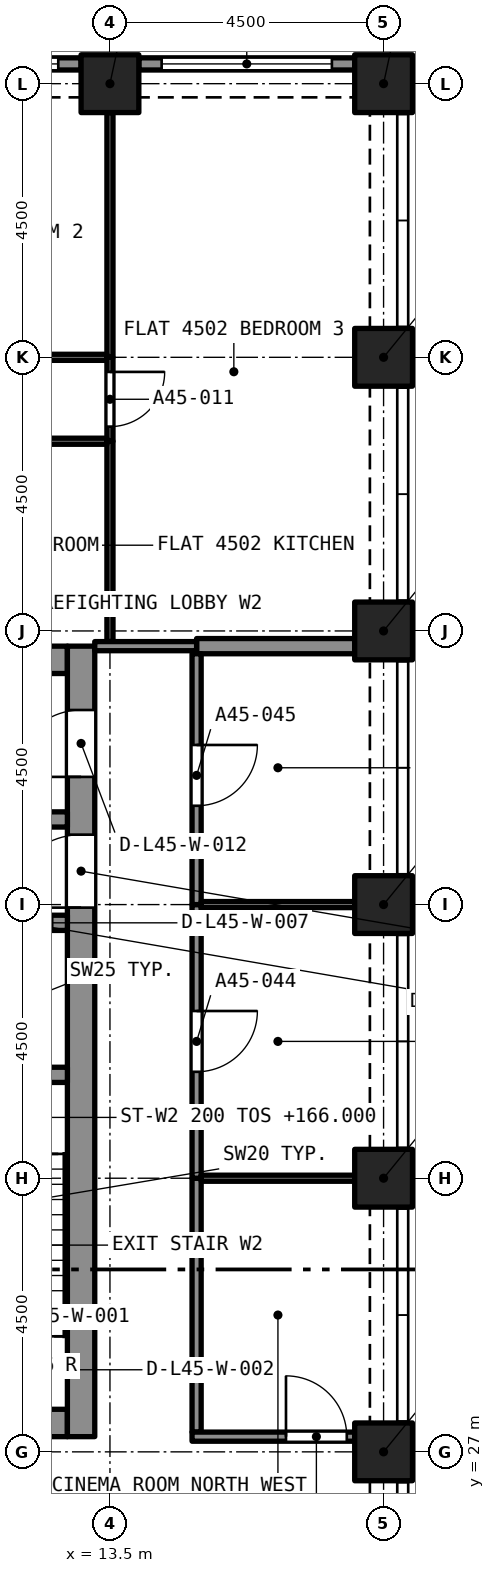
"""IFC4 building model, lengths in metres.
Left out: names, types, materials, properties, quantities, classifications, styles, units other than length and angle.
Written with IfcOpenShell. Run it as: python <this file> out.ifc"""

import sys

from ifc_helpers import new_model, si_unit, direction, frame, frame_2d, origin, origin_2d, place, context, subcontext, project, spatial, rectangle, extrude, element, fill, save


model = new_model("IFC4")
c1 = context("Model", 3, precision=1e-05, world=origin(), true_north=direction((0.0, 1.0)))
c2 = subcontext(c1, "Body", "Model", "MODEL_VIEW")
j1 = project(units=[si_unit("LENGTHUNIT", "METRE"), si_unit("PLANEANGLEUNIT", "RADIAN")], contexts=[c1])
p1 = place(None, origin())
s1 = spatial("IfcSite", under=j1, at=p1, CompositionType="ELEMENT")
p2 = place(p1, origin())
s2 = spatial("IfcBuilding", under=s1, at=p2, CompositionType="ELEMENT")
p3 = place(p2, frame((0.0, 0.0, 163.8)))
s3 = spatial("IfcBuildingStorey", under=s2, at=p3, CompositionType="ELEMENT", Elevation=163.8)
for number, where, z_axis, x_axis in (
    (1, (18.0, 27.0, 0.0), (0.0, 0.0, 1.0), (1.0, 0.0, 0.0)),
    (2, (18.0, 31.5, 0.0), (0.0, 0.0, 1.0), (1.0, 0.0, 0.0)),
    (3, (18.0, 36.0, 0.0), (0.0, 0.0, 1.0), (1.0, 0.0, 0.0)),
    (4, (18.0, 40.5, 0.0), (0.0, 0.0, 1.0), (1.0, 0.0, 0.0)),
    (5, (18.0, 45.0, 0.0), (0.0, 0.0, 1.0), (1.0, 0.0, 0.0)),
    (6, (13.5, 49.5, 0.0), (0.0, 0.0, 1.0), (1.0, 0.0, 0.0)),
    (7, (18.0, 49.5, 0.0), (0.0, 0.0, 1.0), (1.0, 0.0, 0.0)),
):
    element("IfcColumn", number, at=place(p3, frame(where, z_axis=z_axis, x_axis=x_axis)), inside=s3, PredefinedType="COLUMN", context=c2, shape_type="SweptSolid", body=[
        extrude(rectangle(XDim=0.95, YDim=0.95, at=origin_2d()), origin(), (0.0, 0.0, 1.0), 4.4),
    ])
p4 = place(p3, frame((5.2, 27.475, 0.0), z_axis=(0.0, 0.0, 1.0), x_axis=(1.0, 0.0, 0.0)))
e8 = element("IfcWall", 8, at=p4, inside=s3, PredefinedType="SOLIDWALL", context=c2, shape_type="SweptSolid", body=[
    extrude(rectangle(XDim=7.6, YDim=0.45, at=frame_2d((3.8, 0.0))), origin(), (0.0, 0.0, 1.0), 4.4),
])
p5 = place(p4, frame((0.725, 0.0, 0.0)))
e9 = element("IfcOpeningElement", 9, at=p5, cuts=e8, PredefinedType="OPENING", context=c2, shape_type="SweptSolid", body=[
    extrude(rectangle(XDim=1.1, YDim=2.1, at=frame_2d((0.55, 1.05))), frame((0.0, 0.235, 0.0), z_axis=(0.0, -1.0, 0.0), x_axis=(1.0, 0.0, 0.0)), (0.0, 0.0, 1.0), 0.47),
])
p6 = place(p4, frame((3.25, 0.0, 0.0)))
e10 = element("IfcOpeningElement", 10, at=p6, cuts=e8, PredefinedType="OPENING", context=c2, shape_type="SweptSolid", body=[
    extrude(rectangle(XDim=1.1, YDim=2.1, at=frame_2d((0.55, 1.05))), frame((0.0, 0.235, 0.0), z_axis=(0.0, -1.0, 0.0), x_axis=(1.0, 0.0, 0.0)), (0.0, 0.0, 1.0), 0.47),
])
p7 = place(p4, frame((5.775, 0.0, 0.0)))
e11 = element("IfcOpeningElement", 11, at=p7, cuts=e8, PredefinedType="OPENING", context=c2, shape_type="SweptSolid", body=[
    extrude(rectangle(XDim=1.1, YDim=2.1, at=frame_2d((0.55, 1.05))), frame((0.0, 0.235, 0.0), z_axis=(0.0, -1.0, 0.0), x_axis=(1.0, 0.0, 0.0)), (0.0, 0.0, 1.0), 0.47),
])
p8 = place(p3, frame((5.2, 40.025, 0.0), z_axis=(0.0, 0.0, 1.0), x_axis=(1.0, 0.0, 0.0)))
e12 = element("IfcWall", 12, at=p8, inside=s3, PredefinedType="SOLIDWALL", context=c2, shape_type="SweptSolid", body=[
    extrude(rectangle(XDim=7.6, YDim=0.45, at=frame_2d((3.8, 0.0))), origin(), (0.0, 0.0, 1.0), 4.4),
])
p9 = place(p3, frame((13.025, 27.25, 0.0), z_axis=(0.0, 0.0, 1.0), x_axis=(0.0, 1.0, 0.0)))
e13 = element("IfcWall", 13, at=p9, inside=s3, PredefinedType="SOLIDWALL", context=c2, shape_type="SweptSolid", body=[
    extrude(rectangle(XDim=13.0, YDim=0.45, at=frame_2d((6.5, 0.0))), origin(), (0.0, 0.0, 1.0), 4.4),
])
p10 = place(p9, frame((10.85, 0.0, 0.0)))
e14 = element("IfcOpeningElement", 14, at=p10, cuts=e13, PredefinedType="OPENING", context=c2, shape_type="SweptSolid", body=[
    extrude(rectangle(XDim=1.1, YDim=2.1, at=frame_2d((0.55, 1.05))), frame((0.0, 0.235, 0.0), z_axis=(0.0, -1.0, 0.0), x_axis=(1.0, 0.0, 0.0)), (0.0, 0.0, 1.0), 0.47),
])
p11 = place(p9, frame((8.7, 0.0, 0.0)))
e15 = element("IfcOpeningElement", 15, at=p11, cuts=e13, PredefinedType="OPENING", context=c2, shape_type="SweptSolid", body=[
    extrude(rectangle(XDim=1.2, YDim=2.1, at=frame_2d((0.6, 1.05))), frame((0.0, 0.235, 0.0), z_axis=(0.0, -1.0, 0.0), x_axis=(1.0, 0.0, 0.0)), (0.0, 0.0, 1.0), 0.47),
])
p12 = place(p3, frame((13.975, 49.825, 0.0), z_axis=(0.0, 0.0, 1.0), x_axis=(1.0, 0.0, 0.0)))
e16 = element("IfcWall", 16, at=p12, inside=s3, PredefinedType="SOLIDWALL", context=c2, shape_type="SweptSolid", body=[
    extrude(rectangle(XDim=3.55, YDim=0.2, at=frame_2d((1.775, 0.0))), origin(), (0.0, 0.0, 1.0), 4.4),
])
p13 = place(p12, frame((0.375, 0.0, 0.45)))
e17 = element("IfcOpeningElement", 17, at=p13, cuts=e16, PredefinedType="OPENING", context=c2, shape_type="SweptSolid", body=[
    extrude(rectangle(XDim=2.8, YDim=2.55, at=frame_2d((1.4, 1.275))), frame((0.0, 0.11, 0.0), z_axis=(0.0, -1.0, 0.0), x_axis=(1.0, 0.0, 0.0)), (0.0, 0.0, 1.0), 0.22),
])
p14 = place(p3, frame((9.475, 49.825, 0.0), z_axis=(0.0, 0.0, 1.0), x_axis=(1.0, 0.0, 0.0)))
e18 = element("IfcWall", 18, at=p14, inside=s3, PredefinedType="SOLIDWALL", context=c2, shape_type="SweptSolid", body=[
    extrude(rectangle(XDim=3.55, YDim=0.2, at=frame_2d((1.775, 0.0))), origin(), (0.0, 0.0, 1.0), 4.4),
])
p15 = place(p14, frame((0.375, 0.0, 0.45)))
e19 = element("IfcOpeningElement", 19, at=p15, cuts=e18, PredefinedType="OPENING", context=c2, shape_type="SweptSolid", body=[
    extrude(rectangle(XDim=2.8, YDim=2.55, at=frame_2d((1.4, 1.275))), frame((0.0, 0.11, 0.0), z_axis=(0.0, -1.0, 0.0), x_axis=(1.0, 0.0, 0.0)), (0.0, 0.0, 1.0), 0.22),
])
p16 = place(p3, frame((13.5, 45.0, 0.0), z_axis=(0.0, 0.0, 1.0), x_axis=(0.0, 1.0, 0.0)))
e20 = element("IfcWall", 20, at=p16, inside=s3, PredefinedType="PARTITIONING", context=c2, shape_type="SweptSolid", body=[
    extrude(rectangle(XDim=4.025, YDim=0.1, at=frame_2d((2.012, 0.0))), origin(), (0.0, 0.0, 1.0), 4.1),
])
p17 = place(p3, frame((9.0, 45.0, 0.0), z_axis=(0.0, 0.0, 1.0), x_axis=(1.0, 0.0, 0.0)))
e21 = element("IfcWall", 21, at=p17, inside=s3, PredefinedType="PARTITIONING", context=c2, shape_type="SweptSolid", body=[
    extrude(rectangle(XDim=4.45, YDim=0.1, at=frame_2d((2.225, 0.0))), origin(), (0.0, 0.0, 1.0), 4.1),
])
p18 = place(p17, frame((1.8, 0.0, 0.0)))
e22 = element("IfcOpeningElement", 22, at=p18, cuts=e21, PredefinedType="OPENING", context=c2, shape_type="SweptSolid", body=[
    extrude(rectangle(XDim=0.9, YDim=2.1, at=frame_2d((0.45, 1.05))), frame((0.0, 0.06, 0.0), z_axis=(0.0, -1.0, 0.0), x_axis=(1.0, 0.0, 0.0)), (0.0, 0.0, 1.0), 0.12),
])
p19 = place(p3, frame((13.5, 45.0, 0.0), z_axis=(0.0, 0.0, 1.0), x_axis=(0.0, -1.0, 0.0)))
e23 = element("IfcWall", 23, at=p19, inside=s3, PredefinedType="PARTITIONING", context=c2, shape_type="SweptSolid", body=[
    extrude(rectangle(XDim=1.38, YDim=0.1, at=frame_2d((0.69, 0.0))), origin(), (0.0, 0.0, 1.0), 4.1),
])
p20 = place(p19, frame((0.24, 0.0, 0.0)))
e24 = element("IfcOpeningElement", 24, at=p20, cuts=e23, PredefinedType="OPENING", context=c2, shape_type="SweptSolid", body=[
    extrude(rectangle(XDim=0.9, YDim=2.1, at=frame_2d((0.45, 1.05))), frame((0.0, 0.06, 0.0), z_axis=(0.0, -1.0, 0.0), x_axis=(1.0, 0.0, 0.0)), (0.0, 0.0, 1.0), 0.12),
])
p21 = place(p3, frame((13.5, 40.325, 0.0), z_axis=(0.0, 0.0, 1.0), x_axis=(0.0, 1.0, 0.0)))
e25 = element("IfcWall", 25, at=p21, inside=s3, PredefinedType="PARTITIONING", context=c2, shape_type="SweptSolid", body=[
    extrude(rectangle(XDim=3.295, YDim=0.1, at=frame_2d((1.647, 0.0))), origin(), (0.0, 0.0, 1.0), 4.1),
])
p22 = place(p3, frame((14.925, 40.25, 0.0), z_axis=(0.0, 0.0, 1.0), x_axis=(1.0, 0.0, 0.0)))
e26 = element("IfcWall", 26, at=p22, inside=s3, PredefinedType="PARTITIONING", context=c2, shape_type="SweptSolid", body=[
    extrude(rectangle(XDim=2.6, YDim=0.25, at=frame_2d((1.3, 0.0))), origin(), (0.0, 0.0, 1.0), 4.1),
])
p23 = place(p3, frame((13.45, 43.62, 0.0), z_axis=(0.0, 0.0, 1.0), x_axis=(-1.0, 0.0, 0.0)))
e27 = element("IfcWall", 27, at=p23, inside=s3, PredefinedType="PARTITIONING", context=c2, shape_type="SweptSolid", body=[
    extrude(rectangle(XDim=3.6, YDim=0.1, at=frame_2d((1.8, 0.0))), origin(), (0.0, 0.0, 1.0), 4.1),
])
p24 = place(p23, frame((1.325, 0.0, 0.0)))
e28 = element("IfcOpeningElement", 28, at=p24, cuts=e27, PredefinedType="OPENING", context=c2, shape_type="SweptSolid", body=[
    extrude(rectangle(XDim=0.9, YDim=2.1, at=frame_2d((0.45, 1.05))), frame((0.0, 0.06, 0.0), z_axis=(0.0, -1.0, 0.0), x_axis=(1.0, 0.0, 0.0)), (0.0, 0.0, 1.0), 0.12),
])
p25 = place(p3, frame((13.25, 40.25, 0.0), z_axis=(0.0, 0.0, 1.0), x_axis=(1.0, 0.0, 0.0)))
e29 = element("IfcWall", 29, at=p25, inside=s3, PredefinedType="PARTITIONING", context=c2, shape_type="SweptSolid", body=[
    extrude(rectangle(XDim=1.675, YDim=0.15, at=frame_2d((0.837, 0.0))), origin(), (0.0, 0.0, 1.0), 4.1),
])
p26 = place(p3, frame((14.925, 27.325, 0.0), z_axis=(0.0, 0.0, 1.0), x_axis=(0.0, 1.0, 0.0)))
e30 = element("IfcWall", 30, at=p26, inside=s3, PredefinedType="PARTITIONING", context=c2, shape_type="SweptSolid", body=[
    extrude(rectangle(XDim=4.175, YDim=0.15, at=frame_2d((2.087, 0.0))), origin(), (0.0, 0.0, 1.0), 4.1),
])
p27 = place(p3, frame((14.85, 27.25, 0.0), z_axis=(0.0, 0.0, 1.0), x_axis=(1.0, 0.0, 0.0)))
e31 = element("IfcWall", 31, at=p27, inside=s3, PredefinedType="PARTITIONING", context=c2, shape_type="SweptSolid", body=[
    extrude(rectangle(XDim=2.675, YDim=0.15, at=frame_2d((1.337, 0.0))), origin(), (0.0, 0.0, 1.0), 4.1),
])
p28 = place(p27, frame((1.545, 0.0, 0.0)))
e32 = element("IfcOpeningElement", 32, at=p28, cuts=e31, PredefinedType="OPENING", context=c2, shape_type="SweptSolid", body=[
    extrude(rectangle(XDim=1.0, YDim=2.1, at=frame_2d((0.5, 1.05))), frame((0.0, 0.085, 0.0), z_axis=(0.0, -1.0, 0.0), x_axis=(1.0, 0.0, 0.0)), (0.0, 0.0, 1.0), 0.17),
])
p29 = place(p3, frame((14.925, 36.0, 0.0), z_axis=(0.0, 0.0, 1.0), x_axis=(0.0, -1.0, 0.0)))
e33 = element("IfcWall", 33, at=p29, inside=s3, PredefinedType="PARTITIONING", context=c2, shape_type="SweptSolid", body=[
    extrude(rectangle(XDim=4.5, YDim=0.15, at=frame_2d((2.25, 0.0))), origin(), (0.0, 0.0, 1.0), 4.1),
])
p30 = place(p29, frame((1.75, 0.0, 0.0)))
e34 = element("IfcOpeningElement", 34, at=p30, cuts=e33, PredefinedType="OPENING", context=c2, shape_type="SweptSolid", body=[
    extrude(rectangle(XDim=1.0, YDim=2.1, at=frame_2d((0.5, 1.05))), frame((0.0, 0.085, 0.0), z_axis=(0.0, -1.0, 0.0), x_axis=(1.0, 0.0, 0.0)), (0.0, 0.0, 1.0), 0.17),
])
p31 = place(p3, frame((14.925, 40.125, 0.0), z_axis=(0.0, 0.0, 1.0), x_axis=(0.0, -1.0, 0.0)))
e35 = element("IfcWall", 35, at=p31, inside=s3, PredefinedType="PARTITIONING", context=c2, shape_type="SweptSolid", body=[
    extrude(rectangle(XDim=4.125, YDim=0.15, at=frame_2d((2.062, 0.0))), origin(), (0.0, 0.0, 1.0), 4.1),
])
p32 = place(p31, frame((1.5, 0.0, 0.0)))
e36 = element("IfcOpeningElement", 36, at=p32, cuts=e35, PredefinedType="OPENING", context=c2, shape_type="SweptSolid", body=[
    extrude(rectangle(XDim=1.0, YDim=2.1, at=frame_2d((0.5, 1.05))), frame((0.0, 0.085, 0.0), z_axis=(0.0, -1.0, 0.0), x_axis=(1.0, 0.0, 0.0)), (0.0, 0.0, 1.0), 0.17),
])
for number, where, z_axis, x_axis in (
    (37, (15.0, 31.5, 0.0), (0.0, 0.0, 1.0), (1.0, 0.0, 0.0)),
    (38, (15.0, 36.0, 0.0), (0.0, 0.0, 1.0), (1.0, 0.0, 0.0)),
):
    element("IfcWall", number, at=place(p3, frame(where, z_axis=z_axis, x_axis=x_axis)), inside=s3, PredefinedType="PARTITIONING", context=c2, shape_type="SweptSolid", body=[
        extrude(rectangle(XDim=2.525, YDim=0.1, at=frame_2d((1.262, 0.0))), origin(), (0.0, 0.0, 1.0), 4.1),
    ])
p33 = place(p3, frame((5.2, 33.2, 0.0), z_axis=(0.0, 0.0, 1.0), x_axis=(1.0, 0.0, 0.0)))
e39 = element("IfcWall", 39, at=p33, inside=s3, PredefinedType="SOLIDWALL", context=c2, shape_type="SweptSolid", body=[
    extrude(rectangle(XDim=7.6, YDim=0.25, at=frame_2d((3.8, 0.0))), origin(), (0.0, 0.0, 1.0), 4.1),
])
p34 = place(p33, frame((3.3, 0.0, 0.0)))
e40 = element("IfcOpeningElement", 40, at=p34, cuts=e39, PredefinedType="OPENING", context=c2, shape_type="SweptSolid", body=[
    extrude(rectangle(XDim=1.0, YDim=2.1, at=frame_2d((0.5, 1.05))), frame((0.0, 0.135, 0.0), z_axis=(0.0, -1.0, 0.0), x_axis=(1.0, 0.0, 0.0)), (0.0, 0.0, 1.0), 0.27),
])
p35 = place(p3, frame((5.2, 35.7, 0.0), z_axis=(0.0, 0.0, 1.0), x_axis=(1.0, 0.0, 0.0)))
e41 = element("IfcWall", 41, at=p35, inside=s3, PredefinedType="SOLIDWALL", context=c2, shape_type="SweptSolid", body=[
    extrude(rectangle(XDim=7.6, YDim=0.25, at=frame_2d((3.8, 0.0))), origin(), (0.0, 0.0, 1.0), 4.1),
])
p36 = place(p35, frame((0.725, 0.0, 0.0)))
e42 = element("IfcOpeningElement", 42, at=p36, cuts=e41, PredefinedType="OPENING", context=c2, shape_type="SweptSolid", body=[
    extrude(rectangle(XDim=1.1, YDim=2.4, at=frame_2d((0.55, 1.2))), frame((0.0, 0.135, 0.0), z_axis=(0.0, -1.0, 0.0), x_axis=(1.0, 0.0, 0.0)), (0.0, 0.0, 1.0), 0.27),
])
p37 = place(p35, frame((5.125, 0.0, 0.0)))
e43 = element("IfcOpeningElement", 43, at=p37, cuts=e41, PredefinedType="OPENING", context=c2, shape_type="SweptSolid", body=[
    extrude(rectangle(XDim=0.8, YDim=2.1, at=frame_2d((0.4, 1.05))), frame((0.0, 0.135, 0.0), z_axis=(0.0, -1.0, 0.0), x_axis=(1.0, 0.0, 0.0)), (0.0, 0.0, 1.0), 0.27),
])
p38 = place(p35, frame((6.45, 0.0, 0.0)))
e44 = element("IfcOpeningElement", 44, at=p38, cuts=e41, PredefinedType="OPENING", context=c2, shape_type="SweptSolid", body=[
    extrude(rectangle(XDim=0.9, YDim=2.1, at=frame_2d((0.45, 1.05))), frame((0.0, 0.135, 0.0), z_axis=(0.0, -1.0, 0.0), x_axis=(1.0, 0.0, 0.0)), (0.0, 0.0, 1.0), 0.27),
])
p39 = place(p3, frame((5.2, 37.4, 0.0), z_axis=(0.0, 0.0, 1.0), x_axis=(1.0, 0.0, 0.0)))
e45 = element("IfcWall", 45, at=p39, inside=s3, PredefinedType="SOLIDWALL", context=c2, shape_type="SweptSolid", body=[
    extrude(rectangle(XDim=7.6, YDim=0.25, at=frame_2d((3.8, 0.0))), origin(), (0.0, 0.0, 1.0), 4.1),
])
p40 = place(p39, frame((0.7, 0.0, 0.0)))
e46 = element("IfcOpeningElement", 46, at=p40, cuts=e45, PredefinedType="OPENING", context=c2, shape_type="SweptSolid", body=[
    extrude(rectangle(XDim=1.1, YDim=2.4, at=frame_2d((0.55, 1.2))), frame((0.0, 0.135, 0.0), z_axis=(0.0, -1.0, 0.0), x_axis=(1.0, 0.0, 0.0)), (0.0, 0.0, 1.0), 0.27),
])
p41 = place(p13, origin())
e47 = element("IfcWindow", 47, at=p41, inside=s3, PartitioningType="SINGLE_PANEL", PredefinedType="WINDOW", context=c2, shape_type="SweptSolid", body=[
    extrude(rectangle(XDim=2.8, YDim=2.55, at=frame_2d((1.4, 1.275))), frame((0.0, 0.03, 0.0), z_axis=(0.0, -1.0, 0.0), x_axis=(1.0, 0.0, 0.0)), (0.0, 0.0, 1.0), 0.06),
])
fill(e17, e47)
p42 = place(p15, origin())
e48 = element("IfcWindow", 48, at=p42, inside=s3, PartitioningType="SINGLE_PANEL", PredefinedType="WINDOW", context=c2, shape_type="SweptSolid", body=[
    extrude(rectangle(XDim=2.8, YDim=2.55, at=frame_2d((1.4, 1.275))), frame((0.0, 0.03, 0.0), z_axis=(0.0, -1.0, 0.0), x_axis=(1.0, 0.0, 0.0)), (0.0, 0.0, 1.0), 0.06),
])
fill(e19, e48)
p43 = place(p20, origin())
e49 = element("IfcDoor", 49, at=p43, inside=s3, OperationType="SINGLE_SWING_LEFT", PredefinedType="DOOR", context=c2, shape_type="SweptSolid", body=[
    extrude(rectangle(XDim=0.9, YDim=2.1, at=frame_2d((0.45, 1.05))), frame((0.0, 0.025, 0.0), z_axis=(0.0, -1.0, 0.0), x_axis=(1.0, 0.0, 0.0)), (0.0, 0.0, 1.0), 0.05),
])
fill(e24, e49)
p44 = place(p28, origin())
e50 = element("IfcDoor", 50, at=p44, inside=s3, OperationType="SINGLE_SWING_RIGHT", PredefinedType="DOOR", context=c2, shape_type="SweptSolid", body=[
    extrude(rectangle(XDim=1.0, YDim=2.1, at=frame_2d((0.5, 1.05))), frame((0.0, 0.025, 0.0), z_axis=(0.0, -1.0, 0.0), x_axis=(1.0, 0.0, 0.0)), (0.0, 0.0, 1.0), 0.05),
])
fill(e32, e50)
p45 = place(p30, origin())
e51 = element("IfcDoor", 51, at=p45, inside=s3, OperationType="SINGLE_SWING_RIGHT", PredefinedType="DOOR", context=c2, shape_type="SweptSolid", body=[
    extrude(rectangle(XDim=1.0, YDim=2.1, at=frame_2d((0.5, 1.05))), frame((0.0, 0.025, 0.0), z_axis=(0.0, -1.0, 0.0), x_axis=(1.0, 0.0, 0.0)), (0.0, 0.0, 1.0), 0.05),
])
fill(e34, e51)
p46 = place(p32, origin())
e52 = element("IfcDoor", 52, at=p46, inside=s3, OperationType="SINGLE_SWING_LEFT", PredefinedType="DOOR", context=c2, shape_type="SweptSolid", body=[
    extrude(rectangle(XDim=1.0, YDim=2.1, at=frame_2d((0.5, 1.05))), frame((0.0, 0.025, 0.0), z_axis=(0.0, -1.0, 0.0), x_axis=(1.0, 0.0, 0.0)), (0.0, 0.0, 1.0), 0.05),
])
fill(e36, e52)
p47 = place(p10, origin())
e53 = element("IfcDoor", 53, at=p47, inside=s3, OperationType="SINGLE_SWING_LEFT", PredefinedType="DOOR", context=c2, shape_type="SweptSolid", body=[
    extrude(rectangle(XDim=1.1, YDim=2.1, at=frame_2d((0.55, 1.05))), frame((0.0, 0.025, 0.0), z_axis=(0.0, -1.0, 0.0), x_axis=(1.0, 0.0, 0.0)), (0.0, 0.0, 1.0), 0.05),
])
fill(e14, e53)
p48 = place(p11, origin())
e54 = element("IfcDoor", 54, at=p48, inside=s3, OperationType="SINGLE_SWING_LEFT", PredefinedType="DOOR", context=c2, shape_type="SweptSolid", body=[
    extrude(rectangle(XDim=1.2, YDim=2.1, at=frame_2d((0.6, 1.05))), frame((0.0, 0.025, 0.0), z_axis=(0.0, -1.0, 0.0), x_axis=(1.0, 0.0, 0.0)), (0.0, 0.0, 1.0), 0.05),
])
fill(e15, e54)
save(model, sys.argv[1])
